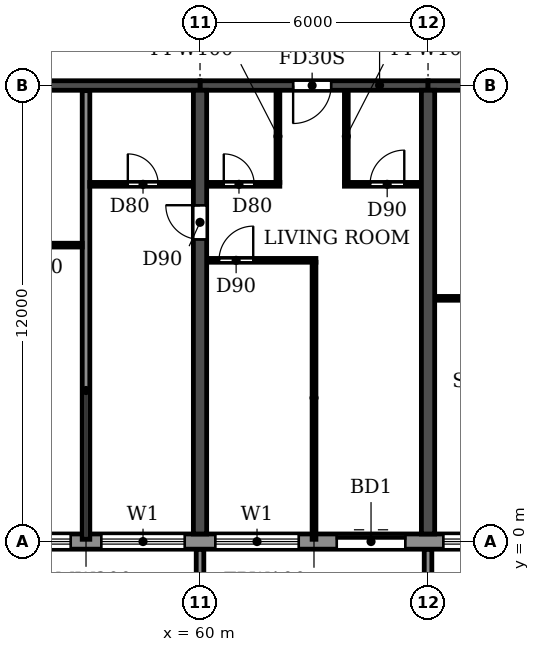
"""IFC4 building model, lengths in metres.
Left out: names, types, materials, properties, quantities, classifications, styles, units other than length and angle.
Written with IfcOpenShell. Run it as: python <this file> out.ifc"""

import sys

from ifc_helpers import new_model, si_unit, direction, frame, frame_2d, origin, place, context, subcontext, project, spatial, polyline, rectangle, outline, extrude, source, transform, mapped, element, fill, save


model = new_model("IFC4")
c1 = context("Model", 3, precision=1e-05, world=origin(), true_north=direction((0.0, 1.0)))
c2 = subcontext(c1, "Body", "Model", "MODEL_VIEW")
j1 = project(units=[si_unit("LENGTHUNIT", "METRE"), si_unit("PLANEANGLEUNIT", "RADIAN")], contexts=[c1])
p1 = place(None, origin())
s1 = spatial("IfcSite", under=j1, at=p1, CompositionType="ELEMENT")
p2 = place(p1, origin())
s2 = spatial("IfcBuilding", under=s1, at=p2, CompositionType="ELEMENT")
p3 = place(p2, frame((0.0, 0.0, 92.7)))
s3 = spatial("IfcBuildingStorey", under=s2, at=p3, CompositionType="ELEMENT", Elevation=92.7)
p4 = place(p3, frame((60.0, 0.2, 0.0), z_axis=(0.0, 0.0, 1.0), x_axis=(0.0, 1.0, 0.0)))
e1 = element("IfcWall", 1, at=p4, inside=s3, PredefinedType="SHEAR", context=c2, shape_type="SweptSolid", body=[
    extrude(rectangle(XDim=11.675, YDim=0.35, at=frame_2d((5.837, 0.0))), origin(), (0.0, 0.0, 1.0), 3.06),
])
p5 = place(p4, frame((7.75, 0.0, 0.0)))
e2 = element("IfcOpeningElement", 2, at=p5, cuts=e1, PredefinedType="OPENING", context=c2, shape_type="SweptSolid", body=[
    extrude(rectangle(XDim=0.9, YDim=2.1, at=frame_2d((0.45, 1.05))), frame((0.0, 0.185, 0.0), z_axis=(0.0, -1.0, 0.0), x_axis=(1.0, 0.0, 0.0)), (0.0, 0.0, 1.0), 0.37),
])
p6 = place(p3, frame((66.0, 0.2, 0.0), z_axis=(0.0, 0.0, 1.0), x_axis=(0.0, 1.0, 0.0)))
e3 = element("IfcWall", 3, at=p6, inside=s3, PredefinedType="SHEAR", context=c2, shape_type="SweptSolid", body=[
    extrude(rectangle(XDim=11.675, YDim=0.35, at=frame_2d((5.837, 0.0))), origin(), (0.0, 0.0, 1.0), 3.06),
])
p7 = place(p3, frame((54.0, 12.0, 0.0), z_axis=(0.0, 0.0, 1.0), x_axis=(1.0, 0.0, 0.0)))
e4 = element("IfcWall", 4, at=p7, inside=s3, PredefinedType="SHEAR", context=c2, shape_type="SweptSolid", body=[
    extrude(rectangle(XDim=6.0, YDim=0.25, at=frame_2d((3.0, 0.0))), origin(), (0.0, 0.0, 1.0), 2.46),
])
p8 = place(p3, frame((60.0, 12.0, 0.0), z_axis=(0.0, 0.0, 1.0), x_axis=(1.0, 0.0, 0.0)))
e5 = element("IfcWall", 5, at=p8, inside=s3, PredefinedType="SHEAR", context=c2, shape_type="SweptSolid", body=[
    extrude(rectangle(XDim=6.0, YDim=0.25, at=frame_2d((3.0, 0.0))), origin(), (0.0, 0.0, 1.0), 2.46),
])
p9 = place(p8, frame((2.45, 0.0, 0.0)))
e6 = element("IfcOpeningElement", 6, at=p9, cuts=e5, PredefinedType="OPENING", context=c2, shape_type="SweptSolid", body=[
    extrude(rectangle(XDim=1.0, YDim=2.1, at=frame_2d((0.5, 1.05))), frame((0.0, 0.135, 0.0), z_axis=(0.0, -1.0, 0.0), x_axis=(1.0, 0.0, 0.0)), (0.0, 0.0, 1.0), 0.27),
])
p10 = place(p3, frame((66.0, 12.0, 0.0), z_axis=(0.0, 0.0, 1.0), x_axis=(1.0, 0.0, 0.0)))
e7 = element("IfcWall", 7, at=p10, inside=s3, PredefinedType="SHEAR", context=c2, shape_type="SweptSolid", body=[
    extrude(rectangle(XDim=6.0, YDim=0.25, at=frame_2d((3.0, 0.0))), origin(), (0.0, 0.0, 1.0), 2.46),
])
p11 = place(p10, frame((2.55, 0.0, 0.0)))
e8 = element("IfcOpeningElement", 8, at=p11, cuts=e7, PredefinedType="OPENING", context=c2, shape_type="SweptSolid", body=[
    extrude(rectangle(XDim=1.0, YDim=2.1, at=frame_2d((0.5, 1.05))), frame((0.0, 0.135, 0.0), z_axis=(0.0, -1.0, 0.0), x_axis=(1.0, 0.0, 0.0)), (0.0, 0.0, 1.0), 0.27),
])
p12 = place(p3, frame((10.683, 0.0, 0.0), z_axis=(0.0, 0.0, 1.0), x_axis=(1.0, 0.0, 0.0)))
e9 = element("IfcWall", 9, at=p12, inside=s3, PredefinedType="STANDARD", context=c2, shape_type="SweptSolid", body=[
    extrude(rectangle(XDim=80.634, YDim=0.4, at=frame_2d((40.317, 0.0))), origin(), (0.0, 0.0, 1.0), 3.06),
])
p13 = place(p12, frame((1.717, 0.0, 0.9)))
e10 = element("IfcOpeningElement", 10, at=p13, cuts=e9, PredefinedType="OPENING", context=c2, shape_type="SweptSolid", body=[
    extrude(rectangle(XDim=2.2, YDim=1.5, at=frame_2d((1.1, 0.75))), frame((0.0, 0.21, 0.0), z_axis=(0.0, -1.0, 0.0), x_axis=(1.0, 0.0, 0.0)), (0.0, 0.0, 1.0), 0.42),
])
p14 = place(p12, frame((4.917, 0.0, 0.0)))
e11 = element("IfcOpeningElement", 11, at=p14, cuts=e9, PredefinedType="OPENING", context=c2, shape_type="SweptSolid", body=[
    extrude(rectangle(XDim=1.8, YDim=2.4, at=frame_2d((0.9, 1.2))), frame((0.0, 0.21, 0.0), z_axis=(0.0, -1.0, 0.0), x_axis=(1.0, 0.0, 0.0)), (0.0, 0.0, 1.0), 0.42),
])
p15 = place(p12, frame((7.717, 0.0, 0.9)))
e12 = element("IfcOpeningElement", 12, at=p15, cuts=e9, PredefinedType="OPENING", context=c2, shape_type="SweptSolid", body=[
    extrude(rectangle(XDim=2.2, YDim=1.5, at=frame_2d((1.1, 0.75))), frame((0.0, 0.21, 0.0), z_axis=(0.0, -1.0, 0.0), x_axis=(1.0, 0.0, 0.0)), (0.0, 0.0, 1.0), 0.42),
])
p16 = place(p12, frame((10.717, 0.0, 0.9)))
e13 = element("IfcOpeningElement", 13, at=p16, cuts=e9, PredefinedType="OPENING", context=c2, shape_type="SweptSolid", body=[
    extrude(rectangle(XDim=2.2, YDim=1.5, at=frame_2d((1.1, 0.75))), frame((0.0, 0.21, 0.0), z_axis=(0.0, -1.0, 0.0), x_axis=(1.0, 0.0, 0.0)), (0.0, 0.0, 1.0), 0.42),
])
p17 = place(p12, frame((13.717, 0.0, 0.9)))
e14 = element("IfcOpeningElement", 14, at=p17, cuts=e9, PredefinedType="OPENING", context=c2, shape_type="SweptSolid", body=[
    extrude(rectangle(XDim=2.2, YDim=1.5, at=frame_2d((1.1, 0.75))), frame((0.0, 0.21, 0.0), z_axis=(0.0, -1.0, 0.0), x_axis=(1.0, 0.0, 0.0)), (0.0, 0.0, 1.0), 0.42),
])
p18 = place(p12, frame((16.717, 0.0, 0.9)))
e15 = element("IfcOpeningElement", 15, at=p18, cuts=e9, PredefinedType="OPENING", context=c2, shape_type="SweptSolid", body=[
    extrude(rectangle(XDim=2.2, YDim=1.5, at=frame_2d((1.1, 0.75))), frame((0.0, 0.21, 0.0), z_axis=(0.0, -1.0, 0.0), x_axis=(1.0, 0.0, 0.0)), (0.0, 0.0, 1.0), 0.42),
])
p19 = place(p12, frame((19.717, 0.0, 0.9)))
e16 = element("IfcOpeningElement", 16, at=p19, cuts=e9, PredefinedType="OPENING", context=c2, shape_type="SweptSolid", body=[
    extrude(rectangle(XDim=2.2, YDim=1.5, at=frame_2d((1.1, 0.75))), frame((0.0, 0.21, 0.0), z_axis=(0.0, -1.0, 0.0), x_axis=(1.0, 0.0, 0.0)), (0.0, 0.0, 1.0), 0.42),
])
p20 = place(p12, frame((22.717, 0.0, 0.9)))
e17 = element("IfcOpeningElement", 17, at=p20, cuts=e9, PredefinedType="OPENING", context=c2, shape_type="SweptSolid", body=[
    extrude(rectangle(XDim=2.2, YDim=1.5, at=frame_2d((1.1, 0.75))), frame((0.0, 0.21, 0.0), z_axis=(0.0, -1.0, 0.0), x_axis=(1.0, 0.0, 0.0)), (0.0, 0.0, 1.0), 0.42),
])
p21 = place(p12, frame((25.717, 0.0, 0.9)))
e18 = element("IfcOpeningElement", 18, at=p21, cuts=e9, PredefinedType="OPENING", context=c2, shape_type="SweptSolid", body=[
    extrude(rectangle(XDim=2.2, YDim=1.5, at=frame_2d((1.1, 0.75))), frame((0.0, 0.21, 0.0), z_axis=(0.0, -1.0, 0.0), x_axis=(1.0, 0.0, 0.0)), (0.0, 0.0, 1.0), 0.42),
])
p22 = place(p12, frame((28.917, 0.0, 0.0)))
e19 = element("IfcOpeningElement", 19, at=p22, cuts=e9, PredefinedType="OPENING", context=c2, shape_type="SweptSolid", body=[
    extrude(rectangle(XDim=1.8, YDim=2.4, at=frame_2d((0.9, 1.2))), frame((0.0, 0.21, 0.0), z_axis=(0.0, -1.0, 0.0), x_axis=(1.0, 0.0, 0.0)), (0.0, 0.0, 1.0), 0.42),
])
p23 = place(p12, frame((31.717, 0.0, 0.9)))
e20 = element("IfcOpeningElement", 20, at=p23, cuts=e9, PredefinedType="OPENING", context=c2, shape_type="SweptSolid", body=[
    extrude(rectangle(XDim=2.2, YDim=1.5, at=frame_2d((1.1, 0.75))), frame((0.0, 0.21, 0.0), z_axis=(0.0, -1.0, 0.0), x_axis=(1.0, 0.0, 0.0)), (0.0, 0.0, 1.0), 0.42),
])
p24 = place(p12, frame((34.717, 0.0, 0.9)))
e21 = element("IfcOpeningElement", 21, at=p24, cuts=e9, PredefinedType="OPENING", context=c2, shape_type="SweptSolid", body=[
    extrude(rectangle(XDim=2.2, YDim=1.5, at=frame_2d((1.1, 0.75))), frame((0.0, 0.21, 0.0), z_axis=(0.0, -1.0, 0.0), x_axis=(1.0, 0.0, 0.0)), (0.0, 0.0, 1.0), 0.42),
])
p25 = place(p12, frame((37.917, 0.0, 0.0)))
e22 = element("IfcOpeningElement", 22, at=p25, cuts=e9, PredefinedType="OPENING", context=c2, shape_type="SweptSolid", body=[
    extrude(rectangle(XDim=1.8, YDim=2.4, at=frame_2d((0.9, 1.2))), frame((0.0, 0.21, 0.0), z_axis=(0.0, -1.0, 0.0), x_axis=(1.0, 0.0, 0.0)), (0.0, 0.0, 1.0), 0.42),
])
p26 = place(p12, frame((40.717, 0.0, 0.9)))
e23 = element("IfcOpeningElement", 23, at=p26, cuts=e9, PredefinedType="OPENING", context=c2, shape_type="SweptSolid", body=[
    extrude(rectangle(XDim=2.2, YDim=1.5, at=frame_2d((1.1, 0.75))), frame((0.0, 0.21, 0.0), z_axis=(0.0, -1.0, 0.0), x_axis=(1.0, 0.0, 0.0)), (0.0, 0.0, 1.0), 0.42),
])
p27 = place(p12, frame((43.717, 0.0, 0.9)))
e24 = element("IfcOpeningElement", 24, at=p27, cuts=e9, PredefinedType="OPENING", context=c2, shape_type="SweptSolid", body=[
    extrude(rectangle(XDim=2.2, YDim=1.5, at=frame_2d((1.1, 0.75))), frame((0.0, 0.21, 0.0), z_axis=(0.0, -1.0, 0.0), x_axis=(1.0, 0.0, 0.0)), (0.0, 0.0, 1.0), 0.42),
])
p28 = place(p12, frame((46.717, 0.0, 0.9)))
e25 = element("IfcOpeningElement", 25, at=p28, cuts=e9, PredefinedType="OPENING", context=c2, shape_type="SweptSolid", body=[
    extrude(rectangle(XDim=2.2, YDim=1.5, at=frame_2d((1.1, 0.75))), frame((0.0, 0.21, 0.0), z_axis=(0.0, -1.0, 0.0), x_axis=(1.0, 0.0, 0.0)), (0.0, 0.0, 1.0), 0.42),
])
p29 = place(p12, frame((49.717, 0.0, 0.9)))
e26 = element("IfcOpeningElement", 26, at=p29, cuts=e9, PredefinedType="OPENING", context=c2, shape_type="SweptSolid", body=[
    extrude(rectangle(XDim=2.2, YDim=1.5, at=frame_2d((1.1, 0.75))), frame((0.0, 0.21, 0.0), z_axis=(0.0, -1.0, 0.0), x_axis=(1.0, 0.0, 0.0)), (0.0, 0.0, 1.0), 0.42),
])
p30 = place(p12, frame((52.917, 0.0, 0.0)))
e27 = element("IfcOpeningElement", 27, at=p30, cuts=e9, PredefinedType="OPENING", context=c2, shape_type="SweptSolid", body=[
    extrude(rectangle(XDim=1.8, YDim=2.4, at=frame_2d((0.9, 1.2))), frame((0.0, 0.21, 0.0), z_axis=(0.0, -1.0, 0.0), x_axis=(1.0, 0.0, 0.0)), (0.0, 0.0, 1.0), 0.42),
])
p31 = place(p12, frame((55.717, 0.0, 0.9)))
e28 = element("IfcOpeningElement", 28, at=p31, cuts=e9, PredefinedType="OPENING", context=c2, shape_type="SweptSolid", body=[
    extrude(rectangle(XDim=2.2, YDim=1.5, at=frame_2d((1.1, 0.75))), frame((0.0, 0.21, 0.0), z_axis=(0.0, -1.0, 0.0), x_axis=(1.0, 0.0, 0.0)), (0.0, 0.0, 1.0), 0.42),
])
p32 = place(p12, frame((58.717, 0.0, 0.9)))
e29 = element("IfcOpeningElement", 29, at=p32, cuts=e9, PredefinedType="OPENING", context=c2, shape_type="SweptSolid", body=[
    extrude(rectangle(XDim=2.2, YDim=1.5, at=frame_2d((1.1, 0.75))), frame((0.0, 0.21, 0.0), z_axis=(0.0, -1.0, 0.0), x_axis=(1.0, 0.0, 0.0)), (0.0, 0.0, 1.0), 0.42),
])
p33 = place(p12, frame((61.717, 0.0, 0.9)))
e30 = element("IfcOpeningElement", 30, at=p33, cuts=e9, PredefinedType="OPENING", context=c2, shape_type="SweptSolid", body=[
    extrude(rectangle(XDim=2.2, YDim=1.5, at=frame_2d((1.1, 0.75))), frame((0.0, 0.21, 0.0), z_axis=(0.0, -1.0, 0.0), x_axis=(1.0, 0.0, 0.0)), (0.0, 0.0, 1.0), 0.42),
])
p34 = place(p12, frame((64.917, 0.0, 0.0)))
e31 = element("IfcOpeningElement", 31, at=p34, cuts=e9, PredefinedType="OPENING", context=c2, shape_type="SweptSolid", body=[
    extrude(rectangle(XDim=1.8, YDim=2.4, at=frame_2d((0.9, 1.2))), frame((0.0, 0.21, 0.0), z_axis=(0.0, -1.0, 0.0), x_axis=(1.0, 0.0, 0.0)), (0.0, 0.0, 1.0), 0.42),
])
p35 = place(p12, frame((67.717, 0.0, 0.9)))
e32 = element("IfcOpeningElement", 32, at=p35, cuts=e9, PredefinedType="OPENING", context=c2, shape_type="SweptSolid", body=[
    extrude(rectangle(XDim=2.2, YDim=1.5, at=frame_2d((1.1, 0.75))), frame((0.0, 0.21, 0.0), z_axis=(0.0, -1.0, 0.0), x_axis=(1.0, 0.0, 0.0)), (0.0, 0.0, 1.0), 0.42),
])
p36 = place(p12, frame((70.717, 0.0, 0.9)))
e33 = element("IfcOpeningElement", 33, at=p36, cuts=e9, PredefinedType="OPENING", context=c2, shape_type="SweptSolid", body=[
    extrude(rectangle(XDim=2.2, YDim=1.5, at=frame_2d((1.1, 0.75))), frame((0.0, 0.21, 0.0), z_axis=(0.0, -1.0, 0.0), x_axis=(1.0, 0.0, 0.0)), (0.0, 0.0, 1.0), 0.42),
])
p37 = place(p12, frame((73.917, 0.0, 0.0)))
e34 = element("IfcOpeningElement", 34, at=p37, cuts=e9, PredefinedType="OPENING", context=c2, shape_type="SweptSolid", body=[
    extrude(rectangle(XDim=1.8, YDim=2.4, at=frame_2d((0.9, 1.2))), frame((0.0, 0.21, 0.0), z_axis=(0.0, -1.0, 0.0), x_axis=(1.0, 0.0, 0.0)), (0.0, 0.0, 1.0), 0.42),
])
p38 = place(p12, frame((76.717, 0.0, 0.9)))
e35 = element("IfcOpeningElement", 35, at=p38, cuts=e9, PredefinedType="OPENING", context=c2, shape_type="SweptSolid", body=[
    extrude(rectangle(XDim=2.2, YDim=1.5, at=frame_2d((1.1, 0.75))), frame((0.0, 0.21, 0.0), z_axis=(0.0, -1.0, 0.0), x_axis=(1.0, 0.0, 0.0)), (0.0, 0.0, 1.0), 0.42),
])
m1 = source(origin(), c2, "Body", "SweptSolid", [
    extrude(outline(polyline([(0.0, 0.0), (0.2, 0.0), (0.2, 1.65), (0.0, 1.65), (0.0, 0.0)])), origin(), (0.0, 0.0, 1.0), 3.1),
])
for number, where in (
    (36, (59.9, -1.85, 0.0)),
    (37, (65.9, -1.85, 0.0)),
):
    element("IfcWall", number, at=place(p3, frame(where)), inside=s3, PredefinedType="STANDARD", context=c2, shape_type="MappedRepresentation", body=[
        mapped(m1, transform((0.0, 0.0, 0.0))),
    ])
p39 = place(p3, frame((57.0, 0.06, 0.0), z_axis=(0.0, 0.0, 1.0), x_axis=(0.0, 1.0, 0.0)))
e38 = element("IfcWall", 38, at=p39, inside=s3, PredefinedType="PARTITIONING", context=c2, shape_type="SweptSolid", body=[
    extrude(rectangle(XDim=11.805, YDim=0.2, at=frame_2d((5.902, 0.0))), origin(), (0.0, 0.0, 1.0), 3.06),
])
p40 = place(p3, frame((66.185, 6.4, 0.0), z_axis=(0.0, 0.0, 1.0), x_axis=(1.0, 0.0, 0.0)))
e39 = element("IfcWall", 39, at=p40, inside=s3, PredefinedType="PARTITIONING", context=c2, shape_type="SweptSolid", body=[
    extrude(rectangle(XDim=2.015, YDim=0.1, at=frame_2d((1.007, 0.0))), origin(), (0.0, 0.0, 1.0), 3.06),
])
p41 = place(p3, frame((60.185, 7.4, 0.0), z_axis=(0.0, 0.0, 1.0), x_axis=(1.0, 0.0, 0.0)))
e40 = element("IfcWall", 40, at=p41, inside=s3, PredefinedType="PARTITIONING", context=c2, shape_type="SweptSolid", body=[
    extrude(rectangle(XDim=2.865, YDim=0.1, at=frame_2d((1.433, 0.0))), origin(), (0.0, 0.0, 1.0), 3.06),
])
p42 = place(p41, frame((0.315, 0.0, 0.0)))
e41 = element("IfcOpeningElement", 41, at=p42, cuts=e40, PredefinedType="OPENING", context=c2, shape_type="SweptSolid", body=[
    extrude(rectangle(XDim=0.9, YDim=2.1, at=frame_2d((0.45, 1.05))), frame((0.0, 0.06, 0.0), z_axis=(0.0, -1.0, 0.0), x_axis=(1.0, 0.0, 0.0)), (0.0, 0.0, 1.0), 0.12),
])
p43 = place(p3, frame((54.185, 7.8, 0.0), z_axis=(0.0, 0.0, 1.0), x_axis=(1.0, 0.0, 0.0)))
e42 = element("IfcWall", 42, at=p43, inside=s3, PredefinedType="PARTITIONING", context=c2, shape_type="SweptSolid", body=[
    extrude(rectangle(XDim=2.715, YDim=0.1, at=frame_2d((1.357, 0.0))), origin(), (0.0, 0.0, 1.0), 3.06),
])
p44 = place(p43, frame((0.915, 0.0, 0.0)))
e43 = element("IfcOpeningElement", 43, at=p44, cuts=e42, PredefinedType="OPENING", context=c2, shape_type="SweptSolid", body=[
    extrude(rectangle(XDim=0.8, YDim=2.1, at=frame_2d((0.4, 1.05))), frame((0.0, 0.06, 0.0), z_axis=(0.0, -1.0, 0.0), x_axis=(1.0, 0.0, 0.0)), (0.0, 0.0, 1.0), 0.12),
])
p45 = place(p3, frame((57.1, 9.4, 0.0), z_axis=(0.0, 0.0, 1.0), x_axis=(1.0, 0.0, 0.0)))
e44 = element("IfcWall", 44, at=p45, inside=s3, PredefinedType="PARTITIONING", context=c2, shape_type="SweptSolid", body=[
    extrude(rectangle(XDim=2.715, YDim=0.1, at=frame_2d((1.357, 0.0))), origin(), (0.0, 0.0, 1.0), 3.06),
])
p46 = place(p45, frame((1.0, 0.0, 0.0)))
e45 = element("IfcOpeningElement", 45, at=p46, cuts=e44, PredefinedType="OPENING", context=c2, shape_type="SweptSolid", body=[
    extrude(rectangle(XDim=0.8, YDim=2.1, at=frame_2d((0.4, 1.05))), frame((0.0, 0.06, 0.0), z_axis=(0.0, -1.0, 0.0), x_axis=(1.0, 0.0, 0.0)), (0.0, 0.0, 1.0), 0.12),
])
p47 = place(p3, frame((60.185, 9.4, 0.0), z_axis=(0.0, 0.0, 1.0), x_axis=(1.0, 0.0, 0.0)))
e46 = element("IfcWall", 46, at=p47, inside=s3, PredefinedType="PARTITIONING", context=c2, shape_type="SweptSolid", body=[
    extrude(rectangle(XDim=1.915, YDim=0.1, at=frame_2d((0.958, 0.0))), origin(), (0.0, 0.0, 1.0), 3.06),
])
p48 = place(p47, frame((0.44, 0.0, 0.0)))
e47 = element("IfcOpeningElement", 47, at=p48, cuts=e46, PredefinedType="OPENING", context=c2, shape_type="SweptSolid", body=[
    extrude(rectangle(XDim=0.8, YDim=2.1, at=frame_2d((0.4, 1.05))), frame((0.0, 0.06, 0.0), z_axis=(0.0, -1.0, 0.0), x_axis=(1.0, 0.0, 0.0)), (0.0, 0.0, 1.0), 0.12),
])
p49 = place(p3, frame((63.8, 9.4, 0.0), z_axis=(0.0, 0.0, 1.0), x_axis=(1.0, 0.0, 0.0)))
e48 = element("IfcWall", 48, at=p49, inside=s3, PredefinedType="PARTITIONING", context=c2, shape_type="SweptSolid", body=[
    extrude(rectangle(XDim=2.015, YDim=0.1, at=frame_2d((1.007, 0.0))), origin(), (0.0, 0.0, 1.0), 3.06),
])
p50 = place(p49, frame((0.675, 0.0, 0.0)))
e49 = element("IfcOpeningElement", 49, at=p50, cuts=e48, PredefinedType="OPENING", context=c2, shape_type="SweptSolid", body=[
    extrude(rectangle(XDim=0.9, YDim=2.1, at=frame_2d((0.45, 1.05))), frame((0.0, 0.06, 0.0), z_axis=(0.0, -1.0, 0.0), x_axis=(1.0, 0.0, 0.0)), (0.0, 0.0, 1.0), 0.12),
])
p51 = place(p3, frame((62.05, 9.45, 0.0), z_axis=(0.0, 0.0, 1.0), x_axis=(0.0, 1.0, 0.0)))
e50 = element("IfcWall", 50, at=p51, inside=s3, PredefinedType="PARTITIONING", context=c2, shape_type="SweptSolid", body=[
    extrude(rectangle(XDim=2.415, YDim=0.1, at=frame_2d((1.208, 0.0))), origin(), (0.0, 0.0, 1.0), 3.06),
])
p52 = place(p3, frame((63.0, 0.06, 0.0), z_axis=(0.0, 0.0, 1.0), x_axis=(0.0, 1.0, 0.0)))
e51 = element("IfcWall", 51, at=p52, inside=s3, PredefinedType="PARTITIONING", context=c2, shape_type="SweptSolid", body=[
    extrude(rectangle(XDim=7.29, YDim=0.1, at=frame_2d((3.645, 0.0))), origin(), (0.0, 0.0, 1.0), 3.06),
])
p53 = place(p3, frame((63.85, 9.45, 0.0), z_axis=(0.0, 0.0, 1.0), x_axis=(0.0, 1.0, 0.0)))
e52 = element("IfcWall", 52, at=p53, inside=s3, PredefinedType="PARTITIONING", context=c2, shape_type="SweptSolid", body=[
    extrude(rectangle(XDim=2.415, YDim=0.1, at=frame_2d((1.208, 0.0))), origin(), (0.0, 0.0, 1.0), 3.06),
])
p54 = place(p27, origin())
e53 = element("IfcWindow", 53, at=p54, inside=s3, PartitioningType="DOUBLE_PANEL_HORIZONTAL", PredefinedType="WINDOW", context=c2, shape_type="SweptSolid", body=[
    extrude(rectangle(XDim=2.2, YDim=1.5, at=frame_2d((1.1, 0.75))), frame((0.0, 0.03, 0.0), z_axis=(0.0, -1.0, 0.0), x_axis=(1.0, 0.0, 0.0)), (0.0, 0.0, 1.0), 0.06),
])
fill(e24, e53)
p55 = place(p28, origin())
e54 = element("IfcWindow", 54, at=p55, inside=s3, PartitioningType="DOUBLE_PANEL_HORIZONTAL", PredefinedType="WINDOW", context=c2, shape_type="SweptSolid", body=[
    extrude(rectangle(XDim=2.2, YDim=1.5, at=frame_2d((1.1, 0.75))), frame((0.0, 0.03, 0.0), z_axis=(0.0, -1.0, 0.0), x_axis=(1.0, 0.0, 0.0)), (0.0, 0.0, 1.0), 0.06),
])
fill(e25, e54)
p56 = place(p29, origin())
e55 = element("IfcWindow", 55, at=p56, inside=s3, PartitioningType="DOUBLE_PANEL_HORIZONTAL", PredefinedType="WINDOW", context=c2, shape_type="SweptSolid", body=[
    extrude(rectangle(XDim=2.2, YDim=1.5, at=frame_2d((1.1, 0.75))), frame((0.0, 0.03, 0.0), z_axis=(0.0, -1.0, 0.0), x_axis=(1.0, 0.0, 0.0)), (0.0, 0.0, 1.0), 0.06),
])
fill(e26, e55)
p57 = place(p30, origin())
e56 = element("IfcDoor", 56, at=p57, inside=s3, OperationType="DOUBLE_DOOR_SLIDING", PredefinedType="DOOR", context=c2, shape_type="SweptSolid", body=[
    extrude(rectangle(XDim=1.8, YDim=2.4, at=frame_2d((0.9, 1.2))), frame((0.0, 0.025, 0.0), z_axis=(0.0, -1.0, 0.0), x_axis=(1.0, 0.0, 0.0)), (0.0, 0.0, 1.0), 0.05),
])
fill(e27, e56)
p58 = place(p31, origin())
e57 = element("IfcWindow", 57, at=p58, inside=s3, PartitioningType="DOUBLE_PANEL_HORIZONTAL", PredefinedType="WINDOW", context=c2, shape_type="SweptSolid", body=[
    extrude(rectangle(XDim=2.2, YDim=1.5, at=frame_2d((1.1, 0.75))), frame((0.0, 0.03, 0.0), z_axis=(0.0, -1.0, 0.0), x_axis=(1.0, 0.0, 0.0)), (0.0, 0.0, 1.0), 0.06),
])
fill(e28, e57)
p59 = place(p46, origin())
e58 = element("IfcDoor", 58, at=p59, inside=s3, OperationType="SINGLE_SWING_LEFT", PredefinedType="DOOR", context=c2, shape_type="SweptSolid", body=[
    extrude(rectangle(XDim=0.8, YDim=2.1, at=frame_2d((0.4, 1.05))), frame((0.0, 0.025, 0.0), z_axis=(0.0, -1.0, 0.0), x_axis=(1.0, 0.0, 0.0)), (0.0, 0.0, 1.0), 0.05),
])
fill(e45, e58)
p60 = place(p5, origin())
e59 = element("IfcDoor", 59, at=p60, inside=s3, OperationType="SINGLE_SWING_RIGHT", PredefinedType="DOOR", context=c2, shape_type="SweptSolid", body=[
    extrude(rectangle(XDim=0.9, YDim=2.1, at=frame_2d((0.45, 1.05))), frame((0.0, 0.025, 0.0), z_axis=(0.0, -1.0, 0.0), x_axis=(1.0, 0.0, 0.0)), (0.0, 0.0, 1.0), 0.05),
])
fill(e2, e59)
p61 = place(p42, origin())
e60 = element("IfcDoor", 60, at=p61, inside=s3, OperationType="SINGLE_SWING_RIGHT", PredefinedType="DOOR", context=c2, shape_type="SweptSolid", body=[
    extrude(rectangle(XDim=0.9, YDim=2.1, at=frame_2d((0.45, 1.05))), frame((0.0, 0.025, 0.0), z_axis=(0.0, -1.0, 0.0), x_axis=(1.0, 0.0, 0.0)), (0.0, 0.0, 1.0), 0.05),
])
fill(e41, e60)
p62 = place(p48, origin())
e61 = element("IfcDoor", 61, at=p62, inside=s3, OperationType="SINGLE_SWING_LEFT", PredefinedType="DOOR", context=c2, shape_type="SweptSolid", body=[
    extrude(rectangle(XDim=0.8, YDim=2.1, at=frame_2d((0.4, 1.05))), frame((0.0, 0.025, 0.0), z_axis=(0.0, -1.0, 0.0), x_axis=(1.0, 0.0, 0.0)), (0.0, 0.0, 1.0), 0.05),
])
fill(e47, e61)
p63 = place(p9, frame((1.0, 0.0, 0.0), z_axis=(0.0, 0.0, 1.0), x_axis=(-1.0, 0.0, 0.0)))
e62 = element("IfcDoor", 62, at=p63, inside=s3, OperationType="SINGLE_SWING_RIGHT", PredefinedType="DOOR", context=c2, shape_type="SweptSolid", body=[
    extrude(rectangle(XDim=1.0, YDim=2.1, at=frame_2d((0.5, 1.05))), frame((0.0, 0.025, 0.0), z_axis=(0.0, -1.0, 0.0), x_axis=(1.0, 0.0, 0.0)), (0.0, 0.0, 1.0), 0.05),
])
fill(e6, e62)
p64 = place(p50, origin())
e63 = element("IfcDoor", 63, at=p64, inside=s3, OperationType="SINGLE_SWING_RIGHT", PredefinedType="DOOR", context=c2, shape_type="SweptSolid", body=[
    extrude(rectangle(XDim=0.9, YDim=2.1, at=frame_2d((0.45, 1.05))), frame((0.0, 0.025, 0.0), z_axis=(0.0, -1.0, 0.0), x_axis=(1.0, 0.0, 0.0)), (0.0, 0.0, 1.0), 0.05),
])
fill(e49, e63)
save(model, sys.argv[1])
